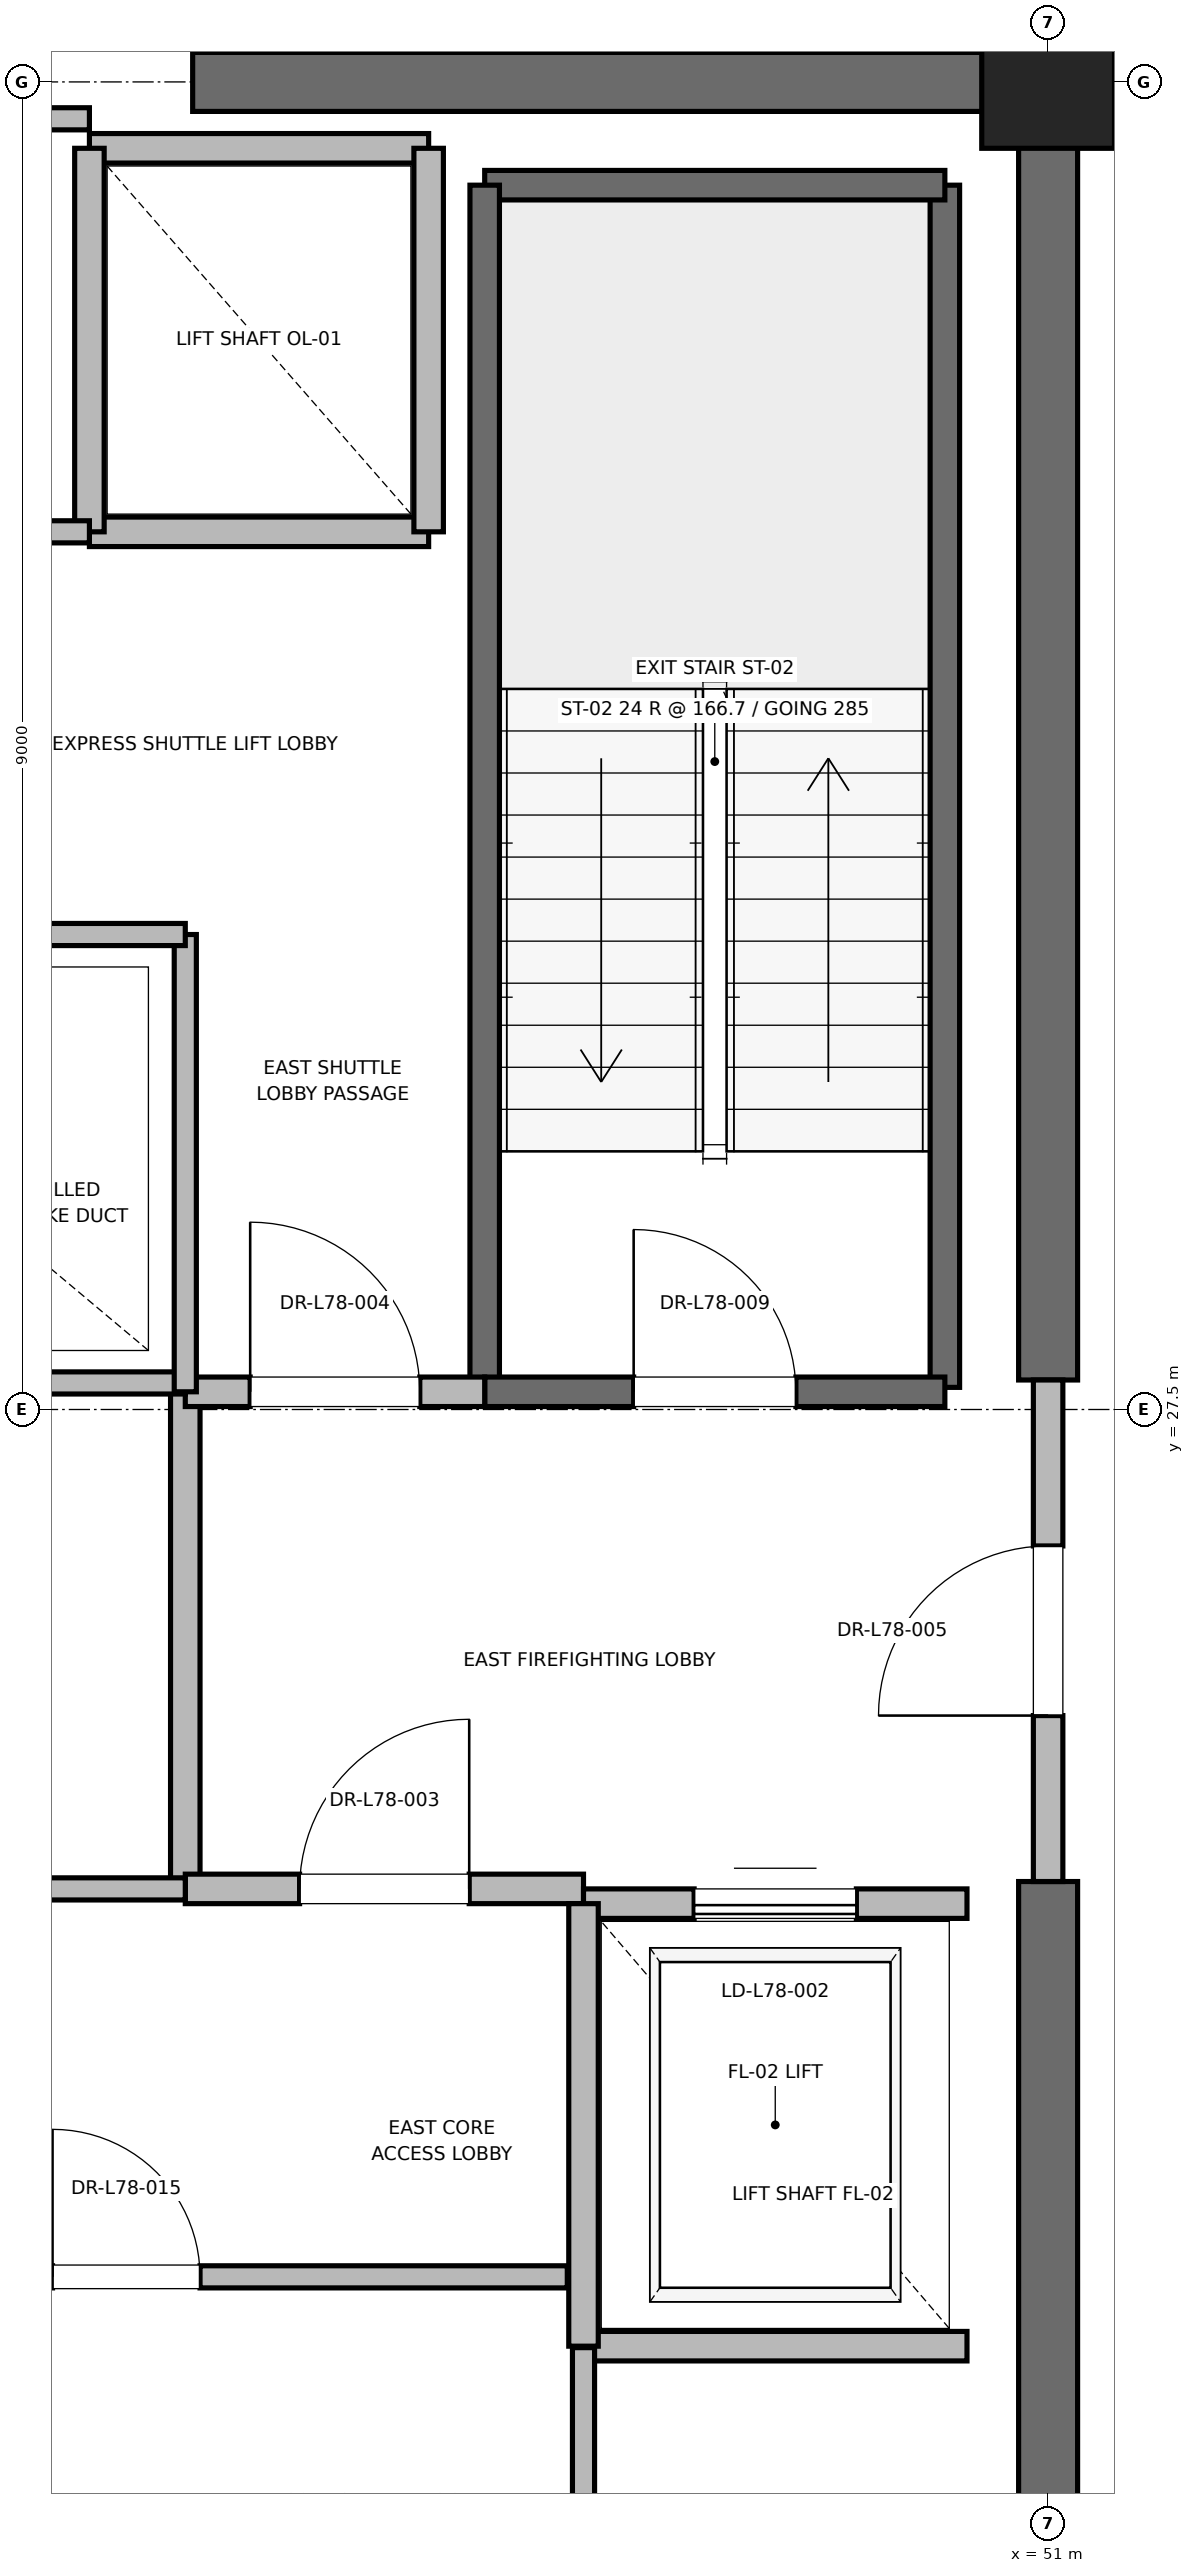
"""IFC4 building model, lengths in metres.
Left out: names, types, materials, properties, quantities, classifications, styles, units other than length and angle.
Written with IfcOpenShell. Run it as: python <this file> out.ifc"""

import sys

from ifc_helpers import new_model, si_unit, direction, frame, frame_2d, origin, origin_2d, place, context, subcontext, project, spatial, rectangle, extrude, element, fill, save


model = new_model("IFC4")
c1 = context("Model", 3, precision=1e-05, world=origin(), true_north=direction((0.0, 1.0)))
c2 = subcontext(c1, "Body", "Model", "MODEL_VIEW")
j1 = project(units=[si_unit("LENGTHUNIT", "METRE"), si_unit("PLANEANGLEUNIT", "RADIAN")], contexts=[c1])
p1 = place(None, origin())
s1 = spatial("IfcSite", under=j1, at=p1, CompositionType="ELEMENT")
p2 = place(p1, origin())
s2 = spatial("IfcBuilding", under=s1, at=p2, CompositionType="ELEMENT")
p3 = place(p2, frame((0.0, 0.0, 334.8)))
s3 = spatial("IfcBuildingStorey", under=s2, at=p3, CompositionType="ELEMENT", Elevation=334.8)
p4 = place(p3, frame((51.0, 36.5, 0.0), z_axis=(0.0, 0.0, 1.0), x_axis=(1.0, 0.0, 0.0)))
e1 = element("IfcColumn", 1, at=p4, inside=s3, PredefinedType="PILASTER", context=c2, shape_type="SweptSolid", body=[
    extrude(rectangle(XDim=0.9, YDim=0.9, at=origin_2d()), origin(), (0.0, 0.0, 1.0), 4.0),
])
for number, where, z_axis, x_axis in (
    (2, (45.2, 36.5, 0.0), (0.0, 0.0, 1.0), (1.0, 0.0, 0.0)),
    (3, (51.0, 18.5, 0.0), (0.0, 0.0, 1.0), (0.0, 1.0, 0.0)),
):
    element("IfcWall", number, at=place(p3, frame(where, z_axis=z_axis, x_axis=x_axis)), inside=s3, PredefinedType="SHEAR", context=c2, shape_type="SweptSolid", body=[
        extrude(rectangle(XDim=5.8, YDim=0.4, at=frame_2d((2.9, 0.0))), origin(), (0.0, 0.0, 1.0), 3.785),
    ])
p5 = place(p3, frame((51.0, 27.7, 0.0), z_axis=(0.0, 0.0, 1.0), x_axis=(0.0, 1.0, 0.0)))
e4 = element("IfcWall", 4, at=p5, inside=s3, PredefinedType="SHEAR", context=c2, shape_type="SweptSolid", body=[
    extrude(rectangle(XDim=8.8, YDim=0.4, at=frame_2d((4.4, 0.0))), origin(), (0.0, 0.0, 1.0), 3.785),
])
p6 = place(p3, frame((50.3, 27.65, 0.0), z_axis=(0.0, 0.0, 1.0), x_axis=(0.0, 1.0, 0.0)))
e5 = element("IfcWall", 5, at=p6, inside=s3, PredefinedType="SOLIDWALL", context=c2, shape_type="SweptSolid", body=[
    extrude(rectangle(XDim=8.15, YDim=0.2, at=frame_2d((4.075, 0.0))), origin(), (0.0, 0.0, 1.0), 3.785),
])
p7 = place(p3, frame((47.18, 35.8, 0.0), z_axis=(0.0, 0.0, 1.0), x_axis=(1.0, 0.0, 0.0)))
e6 = element("IfcWall", 6, at=p7, inside=s3, PredefinedType="SOLIDWALL", context=c2, shape_type="SweptSolid", body=[
    extrude(rectangle(XDim=3.12, YDim=0.2, at=frame_2d((1.56, 0.0))), origin(), (0.0, 0.0, 1.0), 3.785),
])
p8 = place(p3, frame((47.18, 27.62, 0.0), z_axis=(0.0, 0.0, 1.0), x_axis=(0.0, 1.0, 0.0)))
e7 = element("IfcWall", 7, at=p8, inside=s3, PredefinedType="SOLIDWALL", context=c2, shape_type="SweptSolid", body=[
    extrude(rectangle(XDim=8.18, YDim=0.2, at=frame_2d((4.09, 0.0))), origin(), (0.0, 0.0, 1.0), 3.785),
])
p9 = place(p3, frame((47.18, 27.62, 0.0), z_axis=(0.0, 0.0, 1.0), x_axis=(1.0, 0.0, 0.0)))
e8 = element("IfcWall", 8, at=p9, inside=s3, PredefinedType="SOLIDWALL", context=c2, shape_type="SweptSolid", body=[
    extrude(rectangle(XDim=3.12, YDim=0.2, at=frame_2d((1.56, 0.0))), origin(), (0.0, 0.0, 1.0), 3.785),
])
p10 = place(p9, frame((1.01, 0.0, 0.0)))
e9 = element("IfcOpeningElement", 9, at=p10, cuts=e8, PredefinedType="OPENING", context=c2, shape_type="SweptSolid", body=[
    extrude(rectangle(XDim=1.1, YDim=2.15, at=frame_2d((0.55, 1.075))), frame((0.0, 0.1, 0.0), z_axis=(0.0, -1.0, 0.0), x_axis=(1.0, 0.0, 0.0)), (0.0, 0.0, 1.0), 0.2),
])
p11 = place(p3, frame((45.15, 24.25, 0.0), z_axis=(0.0, 0.0, 1.0), x_axis=(0.0, 1.0, 0.0)))
e10 = element("IfcWall", 10, at=p11, inside=s3, PredefinedType="PARTITIONING", context=c2, shape_type="SweptSolid", body=[
    extrude(rectangle(XDim=3.37, YDim=0.2, at=frame_2d((1.685, 0.0))), origin(), (0.0, 0.0, 1.0), 3.785),
])
p12 = place(p3, frame((45.15, 24.25, 0.0), z_axis=(0.0, 0.0, 1.0), x_axis=(1.0, 0.0, 0.0)))
e11 = element("IfcWall", 11, at=p12, inside=s3, PredefinedType="PARTITIONING", context=c2, shape_type="SweptSolid", body=[
    extrude(rectangle(XDim=2.7, YDim=0.2, at=frame_2d((1.35, 0.0))), origin(), (0.0, 0.0, 1.0), 3.785),
])
p13 = place(p12, frame((0.775, 0.0, 0.0)))
e12 = element("IfcOpeningElement", 12, at=p13, cuts=e11, PredefinedType="OPENING", context=c2, shape_type="SweptSolid", body=[
    extrude(rectangle(XDim=1.15, YDim=2.2, at=frame_2d((0.575, 1.1))), frame((0.0, 0.1, 0.0), z_axis=(0.0, -1.0, 0.0), x_axis=(1.0, 0.0, 0.0)), (0.0, 0.0, 1.0), 0.2),
])
p14 = place(p3, frame((45.15, 27.62, 0.0), z_axis=(0.0, 0.0, 1.0), x_axis=(1.0, 0.0, 0.0)))
e13 = element("IfcWall", 13, at=p14, inside=s3, PredefinedType="PARTITIONING", context=c2, shape_type="SweptSolid", body=[
    extrude(rectangle(XDim=2.03, YDim=0.2, at=frame_2d((1.015, 0.0))), origin(), (0.0, 0.0, 1.0), 3.785),
])
p15 = place(p14, frame((0.44, 0.0, 0.0)))
e14 = element("IfcOpeningElement", 14, at=p15, cuts=e13, PredefinedType="OPENING", context=c2, shape_type="SweptSolid", body=[
    extrude(rectangle(XDim=1.15, YDim=2.2, at=frame_2d((0.575, 1.1))), frame((0.0, 0.1, 0.0), z_axis=(0.0, -1.0, 0.0), x_axis=(1.0, 0.0, 0.0)), (0.0, 0.0, 1.0), 0.2),
])
p16 = place(p3, frame((51.0, 24.3, 0.0), z_axis=(0.0, 0.0, 1.0), x_axis=(0.0, 1.0, 0.0)))
e15 = element("IfcWall", 15, at=p16, inside=s3, PredefinedType="PARTITIONING", context=c2, shape_type="SweptSolid", body=[
    extrude(rectangle(XDim=3.4, YDim=0.2, at=frame_2d((1.7, 0.0))), origin(), (0.0, 0.0, 1.0), 2.865),
])
p17 = place(p16, frame((1.125, 0.0, 0.0)))
e16 = element("IfcOpeningElement", 16, at=p17, cuts=e15, PredefinedType="OPENING", context=c2, shape_type="SweptSolid", body=[
    extrude(rectangle(XDim=1.15, YDim=2.2, at=frame_2d((0.575, 1.1))), frame((0.0, 0.1, 0.0), z_axis=(0.0, -1.0, 0.0), x_axis=(1.0, 0.0, 0.0)), (0.0, 0.0, 1.0), 0.2),
])
p18 = place(p3, frame((47.85, 21.15, 0.0), z_axis=(0.0, 0.0, 1.0), x_axis=(1.0, 0.0, 0.0)))
e17 = element("IfcWall", 17, at=p18, inside=s3, PredefinedType="SOLIDWALL", context=c2, shape_type="SweptSolid", body=[
    extrude(rectangle(XDim=2.6, YDim=0.2, at=frame_2d((1.3, 0.0))), origin(), (0.0, 0.0, 1.0), 3.785),
])
p19 = place(p3, frame((50.45, 24.15, 0.0), z_axis=(0.0, 0.0, 1.0), x_axis=(-1.0, 0.0, 0.0)))
e18 = element("IfcWall", 18, at=p19, inside=s3, PredefinedType="SOLIDWALL", context=c2, shape_type="SweptSolid", body=[
    extrude(rectangle(XDim=2.6, YDim=0.2, at=frame_2d((1.3, 0.0))), origin(), (0.0, 0.0, 1.0), 2.865),
])
p20 = place(p19, frame((0.75, 0.0, 0.0)))
e19 = element("IfcOpeningElement", 19, at=p20, cuts=e18, PredefinedType="OPENING", context=c2, shape_type="SweptSolid", body=[
    extrude(rectangle(XDim=1.1, YDim=2.2, at=frame_2d((0.55, 1.1))), frame((0.0, 0.1, 0.0), z_axis=(0.0, -1.0, 0.0), x_axis=(1.0, 0.0, 0.0)), (0.0, 0.0, 1.0), 0.2),
])
p21 = place(p3, frame((47.85, 24.15, 0.0), z_axis=(0.0, 0.0, 1.0), x_axis=(0.0, -1.0, 0.0)))
e20 = element("IfcWall", 20, at=p21, inside=s3, PredefinedType="SOLIDWALL", context=c2, shape_type="SweptSolid", body=[
    extrude(rectangle(XDim=3.0, YDim=0.2, at=frame_2d((1.5, 0.0))), origin(), (0.0, 0.0, 1.0), 3.785),
])
p22 = place(p3, frame((44.5, 33.45, 0.0), z_axis=(0.0, 0.0, 1.0), x_axis=(1.0, 0.0, 0.0)))
e21 = element("IfcWall", 21, at=p22, inside=s3, PredefinedType="SOLIDWALL", context=c2, shape_type="SweptSolid", body=[
    extrude(rectangle(XDim=2.3, YDim=0.2, at=frame_2d((1.15, 0.0))), origin(), (0.0, 0.0, 1.0), 3.785),
])
p23 = place(p3, frame((46.8, 36.05, 0.0), z_axis=(0.0, 0.0, 1.0), x_axis=(-1.0, 0.0, 0.0)))
e22 = element("IfcWall", 22, at=p23, inside=s3, PredefinedType="SOLIDWALL", context=c2, shape_type="SweptSolid", body=[
    extrude(rectangle(XDim=2.3, YDim=0.2, at=frame_2d((1.15, 0.0))), origin(), (0.0, 0.0, 1.0), 2.865),
])
p24 = place(p3, frame((44.5, 36.05, 0.0), z_axis=(0.0, 0.0, 1.0), x_axis=(0.0, -1.0, 0.0)))
e23 = element("IfcWall", 23, at=p24, inside=s3, PredefinedType="SOLIDWALL", context=c2, shape_type="SweptSolid", body=[
    extrude(rectangle(XDim=2.6, YDim=0.2, at=frame_2d((1.3, 0.0))), origin(), (0.0, 0.0, 1.0), 2.865),
])
p25 = place(p3, frame((46.8, 33.45, 0.0), z_axis=(0.0, 0.0, 1.0), x_axis=(0.0, 1.0, 0.0)))
e24 = element("IfcWall", 24, at=p25, inside=s3, PredefinedType="SOLIDWALL", context=c2, shape_type="SweptSolid", body=[
    extrude(rectangle(XDim=2.6, YDim=0.2, at=frame_2d((1.3, 0.0))), origin(), (0.0, 0.0, 1.0), 3.785),
])
p26 = place(p3, frame((41.56, 27.68, 0.0), z_axis=(0.0, 0.0, 1.0), x_axis=(1.0, 0.0, 0.0)))
e25 = element("IfcWall", 25, at=p26, inside=s3, PredefinedType="PARTITIONING", context=c2, shape_type="SweptSolid", body=[
    extrude(rectangle(XDim=3.59, YDim=0.15, at=frame_2d((1.795, 0.0))), origin(), (0.0, 0.0, 1.0), 2.85),
])
p27 = place(p3, frame((47.85, 18.6, 0.0), z_axis=(0.0, 0.0, 1.0), x_axis=(0.0, 1.0, 0.0)))
e26 = element("IfcWall", 26, at=p27, inside=s3, PredefinedType="PARTITIONING", context=c2, shape_type="SweptSolid", body=[
    extrude(rectangle(XDim=2.54, YDim=0.15, at=frame_2d((1.27, 0.0))), origin(), (0.0, 0.0, 1.0), 2.85),
])
p28 = place(p3, frame((41.76, 21.62, 0.0), z_axis=(0.0, 0.0, 1.0), x_axis=(1.0, 0.0, 0.0)))
e27 = element("IfcWall", 27, at=p28, inside=s3, PredefinedType="PARTITIONING", context=c2, shape_type="SweptSolid", body=[
    extrude(rectangle(XDim=5.98, YDim=0.15, at=frame_2d((2.99, 0.0))), origin(), (0.0, 0.0, 1.0), 2.85),
])
p29 = place(p28, frame((2.49, 0.0, 0.0)))
e28 = element("IfcOpeningElement", 28, at=p29, cuts=e27, PredefinedType="OPENING", context=c2, shape_type="SweptSolid", body=[
    extrude(rectangle(XDim=1.0, YDim=2.15, at=frame_2d((0.5, 1.075))), frame((0.0, 0.075, 0.0), z_axis=(0.0, -1.0, 0.0), x_axis=(1.0, 0.0, 0.0)), (0.0, 0.0, 1.0), 0.15),
])
p30 = place(p3, frame((41.76, 24.25, 0.0), z_axis=(0.0, 0.0, 1.0), x_axis=(1.0, 0.0, 0.0)))
e29 = element("IfcWall", 29, at=p30, inside=s3, PredefinedType="PARTITIONING", context=c2, shape_type="SweptSolid", body=[
    extrude(rectangle(XDim=3.39, YDim=0.15, at=frame_2d((1.695, 0.0))), origin(), (0.0, 0.0, 1.0), 2.85),
])
p31 = place(p30, frame((1.195, 0.0, 0.0)))
e30 = element("IfcOpeningElement", 30, at=p31, cuts=e29, PredefinedType="OPENING", context=c2, shape_type="SweptSolid", body=[
    extrude(rectangle(XDim=1.0, YDim=2.15, at=frame_2d((0.5, 1.075))), frame((0.0, 0.075, 0.0), z_axis=(0.0, -1.0, 0.0), x_axis=(1.0, 0.0, 0.0)), (0.0, 0.0, 1.0), 0.15),
])
p32 = place(p3, frame((45.15, 27.62, 0.0), z_axis=(0.0, 0.0, 1.0), x_axis=(0.0, 1.0, 0.0)))
e31 = element("IfcWall", 31, at=p32, inside=s3, PredefinedType="PARTITIONING", context=c2, shape_type="SweptSolid", body=[
    extrude(rectangle(XDim=3.1, YDim=0.15, at=frame_2d((1.55, 0.0))), origin(), (0.0, 0.0, 1.0), 2.85),
])
p33 = place(p3, frame((41.56, 30.72, 0.0), z_axis=(0.0, 0.0, 1.0), x_axis=(1.0, 0.0, 0.0)))
e32 = element("IfcWall", 32, at=p33, inside=s3, PredefinedType="PARTITIONING", context=c2, shape_type="SweptSolid", body=[
    extrude(rectangle(XDim=3.59, YDim=0.15, at=frame_2d((1.795, 0.0))), origin(), (0.0, 0.0, 1.0), 2.85),
])
p34 = place(p33, frame((1.355, 0.0, 0.0)))
e33 = element("IfcOpeningElement", 33, at=p34, cuts=e32, PredefinedType="OPENING", context=c2, shape_type="SweptSolid", body=[
    extrude(rectangle(XDim=0.88, YDim=2.1, at=frame_2d((0.44, 1.05))), frame((0.0, 0.075, 0.0), z_axis=(0.0, -1.0, 0.0), x_axis=(1.0, 0.0, 0.0)), (0.0, 0.0, 1.0), 0.15),
])
p35 = place(p3, frame((41.56, 36.25, 0.0), z_axis=(0.0, 0.0, 1.0), x_axis=(1.0, 0.0, 0.0)))
e34 = element("IfcWall", 34, at=p35, inside=s3, PredefinedType="PARTITIONING", context=c2, shape_type="SweptSolid", body=[
    extrude(rectangle(XDim=2.94, YDim=0.15, at=frame_2d((1.47, 0.0))), origin(), (0.0, 0.0, 1.0), 2.85),
])
p36 = place(p3, frame((41.56, 33.45, 0.0), z_axis=(0.0, 0.0, 1.0), x_axis=(1.0, 0.0, 0.0)))
e35 = element("IfcWall", 35, at=p36, inside=s3, PredefinedType="PARTITIONING", context=c2, shape_type="SweptSolid", body=[
    extrude(rectangle(XDim=2.94, YDim=0.15, at=frame_2d((1.47, 0.0))), origin(), (0.0, 0.0, 1.0), 2.85),
])
p37 = place(p36, frame((1.03, 0.0, 0.0)))
e36 = element("IfcOpeningElement", 36, at=p37, cuts=e35, PredefinedType="OPENING", context=c2, shape_type="SweptSolid", body=[
    extrude(rectangle(XDim=0.88, YDim=2.1, at=frame_2d((0.44, 1.05))), frame((0.0, 0.075, 0.0), z_axis=(0.0, -1.0, 0.0), x_axis=(1.0, 0.0, 0.0)), (0.0, 0.0, 1.0), 0.15),
])
p38 = place(p10, origin())
e37 = element("IfcDoor", 37, at=p38, inside=s3, OperationType="SINGLE_SWING_LEFT", PredefinedType="DOOR", context=c2, shape_type="SweptSolid", body=[
    extrude(rectangle(XDim=1.1, YDim=2.15, at=frame_2d((0.55, 1.075))), frame((0.0, 0.025, 0.0), z_axis=(0.0, -1.0, 0.0), x_axis=(1.0, 0.0, 0.0)), (0.0, 0.0, 1.0), 0.05),
])
fill(e9, e37)
p39 = place(p13, origin())
e38 = element("IfcDoor", 38, at=p39, inside=s3, OperationType="SINGLE_SWING_RIGHT", PredefinedType="DOOR", context=c2, shape_type="SweptSolid", body=[
    extrude(rectangle(XDim=1.15, YDim=2.2, at=frame_2d((0.575, 1.1))), frame((0.0, 0.025, 0.0), z_axis=(0.0, -1.0, 0.0), x_axis=(1.0, 0.0, 0.0)), (0.0, 0.0, 1.0), 0.05),
])
fill(e12, e38)
p40 = place(p15, origin())
e39 = element("IfcDoor", 39, at=p40, inside=s3, OperationType="SINGLE_SWING_LEFT", PredefinedType="DOOR", context=c2, shape_type="SweptSolid", body=[
    extrude(rectangle(XDim=1.15, YDim=2.2, at=frame_2d((0.575, 1.1))), frame((0.0, 0.025, 0.0), z_axis=(0.0, -1.0, 0.0), x_axis=(1.0, 0.0, 0.0)), (0.0, 0.0, 1.0), 0.05),
])
fill(e14, e39)
p41 = place(p17, origin())
e40 = element("IfcDoor", 40, at=p41, inside=s3, OperationType="SINGLE_SWING_LEFT", PredefinedType="DOOR", context=c2, shape_type="SweptSolid", body=[
    extrude(rectangle(XDim=1.15, YDim=2.2, at=frame_2d((0.575, 1.1))), frame((0.0, 0.025, 0.0), z_axis=(0.0, -1.0, 0.0), x_axis=(1.0, 0.0, 0.0)), (0.0, 0.0, 1.0), 0.05),
])
fill(e16, e40)
p42 = place(p20, origin())
e41 = element("IfcDoor", 41, at=p42, inside=s3, OperationType="SLIDING_TO_RIGHT", PredefinedType="DOOR", context=c2, shape_type="SweptSolid", body=[
    extrude(rectangle(XDim=1.1, YDim=2.2, at=frame_2d((0.55, 1.1))), frame((0.0, 0.025, 0.0), z_axis=(0.0, -1.0, 0.0), x_axis=(1.0, 0.0, 0.0)), (0.0, 0.0, 1.0), 0.05),
])
fill(e19, e41)
p43 = place(p29, origin())
e42 = element("IfcDoor", 42, at=p43, inside=s3, OperationType="SINGLE_SWING_LEFT", PredefinedType="DOOR", context=c2, shape_type="SweptSolid", body=[
    extrude(rectangle(XDim=1.0, YDim=2.15, at=frame_2d((0.5, 1.075))), frame((0.0, 0.025, 0.0), z_axis=(0.0, -1.0, 0.0), x_axis=(1.0, 0.0, 0.0)), (0.0, 0.0, 1.0), 0.05),
])
fill(e28, e42)
save(model, sys.argv[1])
